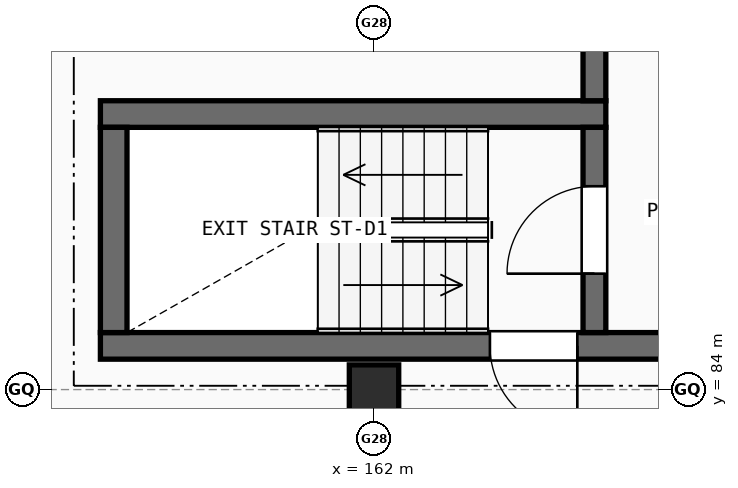
"""IFC4 building model, lengths in metres.
Left out: names, types, materials, properties, quantities, classifications, styles, units other than length and angle.
Written with IfcOpenShell. Run it as: python <this file> out.ifc"""

import sys

from ifc_helpers import new_model, si_unit, direction, frame, frame_2d, origin, origin_2d, place, context, subcontext, project, spatial, rectangle, extrude, element, fill, save


model = new_model("IFC4")
c1 = context("Model", 3, precision=1e-05, world=origin(), true_north=direction((0.0, 1.0)))
c2 = subcontext(c1, "Body", "Model", "MODEL_VIEW")
j1 = project(units=[si_unit("LENGTHUNIT", "METRE"), si_unit("PLANEANGLEUNIT", "RADIAN")], contexts=[c1])
p1 = place(None, origin())
s1 = spatial("IfcSite", under=j1, at=p1, CompositionType="ELEMENT")
p2 = place(p1, origin())
s2 = spatial("IfcBuilding", under=s1, at=p2, CompositionType="ELEMENT")
p3 = place(p2, frame((0.0, 0.0, 7.7)))
s3 = spatial("IfcBuildingStorey", under=s2, at=p3, CompositionType="ELEMENT", Elevation=7.7)
p4 = place(p3, frame((162.0, 84.0, 0.0), z_axis=(0.0, 0.0, 1.0), x_axis=(1.0, 0.0, 0.0)))
e1 = element("IfcColumn", 1, at=p4, inside=s3, PredefinedType="COLUMN", context=c2, shape_type="SweptSolid", body=[
    extrude(rectangle(XDim=0.65, YDim=0.65, at=origin_2d()), origin(), (0.0, 0.0, 1.0), 2.955),
])
p5 = place(p3, frame((158.4, 84.575, 0.0), z_axis=(0.0, 0.0, 1.0), x_axis=(1.0, 0.0, 0.0)))
e2 = element("IfcWall", 2, at=p5, inside=s3, PredefinedType="SHEAR", context=c2, shape_type="SweptSolid", body=[
    extrude(rectangle(XDim=11.4, YDim=0.35, at=frame_2d((5.7, 0.0))), origin(), (0.0, 0.0, 1.0), 2.955),
])
p6 = place(p5, frame((5.125, 0.0, 0.0)))
e3 = element("IfcOpeningElement", 3, at=p6, cuts=e2, PredefinedType="OPENING", context=c2, shape_type="SweptSolid", body=[
    extrude(rectangle(XDim=1.15, YDim=2.15, at=frame_2d((0.575, 1.075))), frame((0.0, 0.185, 0.0), z_axis=(0.0, -1.0, 0.0), x_axis=(1.0, 0.0, 0.0)), (0.0, 0.0, 1.0), 0.37),
])
p7 = place(p3, frame((165.05, 87.625, 0.0), z_axis=(0.0, 0.0, 1.0), x_axis=(-1.0, 0.0, 0.0)))
e4 = element("IfcWall", 4, at=p7, inside=s3, PredefinedType="SHEAR", context=c2, shape_type="SweptSolid", body=[
    extrude(rectangle(XDim=6.65, YDim=0.35, at=frame_2d((3.325, 0.0))), origin(), (0.0, 0.0, 1.0), 2.955),
])
p8 = place(p3, frame((158.575, 87.45, 0.0), z_axis=(0.0, 0.0, 1.0), x_axis=(0.0, -1.0, 0.0)))
e5 = element("IfcWall", 5, at=p8, inside=s3, PredefinedType="SHEAR", context=c2, shape_type="SweptSolid", body=[
    extrude(rectangle(XDim=2.7, YDim=0.35, at=frame_2d((1.35, 0.0))), origin(), (0.0, 0.0, 1.0), 2.955),
])
p9 = place(p3, frame((164.9, 84.75, 0.0), z_axis=(0.0, 0.0, 1.0), x_axis=(0.0, 1.0, 0.0)))
e6 = element("IfcWall", 6, at=p9, inside=s3, PredefinedType="SHEAR", context=c2, shape_type="SweptSolid", body=[
    extrude(rectangle(XDim=2.7, YDim=0.3, at=frame_2d((1.35, 0.0))), origin(), (0.0, 0.0, 1.0), 2.955),
])
p10 = place(p9, frame((0.775, 0.0, 0.0)))
e7 = element("IfcOpeningElement", 7, at=p10, cuts=e6, PredefinedType="OPENING", context=c2, shape_type="SweptSolid", body=[
    extrude(rectangle(XDim=1.15, YDim=2.15, at=frame_2d((0.575, 1.075))), frame((0.0, 0.16, 0.0), z_axis=(0.0, -1.0, 0.0), x_axis=(1.0, 0.0, 0.0)), (0.0, 0.0, 1.0), 0.32),
])
p11 = place(p3, frame((164.9, 87.8, 0.0), z_axis=(0.0, 0.0, 1.0), x_axis=(0.0, 1.0, 0.0)))
e8 = element("IfcWall", 8, at=p11, inside=s3, PredefinedType="SHEAR", context=c2, shape_type="SweptSolid", body=[
    extrude(rectangle(XDim=3.35, YDim=0.3, at=frame_2d((1.675, 0.0))), origin(), (0.0, 0.0, 1.0), 2.955),
])
p12 = place(p6, origin())
e9 = element("IfcDoor", 9, at=p12, inside=s3, OperationType="SINGLE_SWING_RIGHT", PredefinedType="DOOR", context=c2, shape_type="SweptSolid", body=[
    extrude(rectangle(XDim=1.15, YDim=2.15, at=frame_2d((0.575, 1.075))), frame((0.0, 0.025, 0.0), z_axis=(0.0, -1.0, 0.0), x_axis=(1.0, 0.0, 0.0)), (0.0, 0.0, 1.0), 0.05),
])
fill(e3, e9)
p13 = place(p10, origin())
e10 = element("IfcDoor", 10, at=p13, inside=s3, OperationType="SINGLE_SWING_LEFT", PredefinedType="DOOR", context=c2, shape_type="SweptSolid", body=[
    extrude(rectangle(XDim=1.15, YDim=2.15, at=frame_2d((0.575, 1.075))), frame((0.0, 0.025, 0.0), z_axis=(0.0, -1.0, 0.0), x_axis=(1.0, 0.0, 0.0)), (0.0, 0.0, 1.0), 0.05),
])
fill(e7, e10)
save(model, sys.argv[1])
